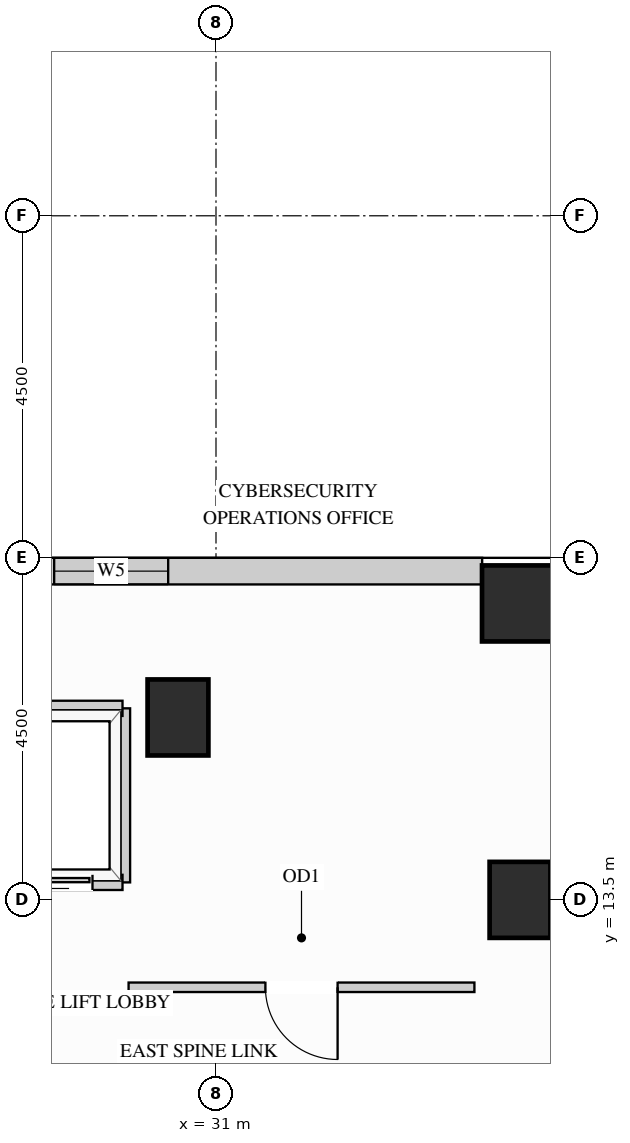
"""IFC4 building model, lengths in metres.
Left out: names, types, materials, properties, quantities, classifications, styles, units other than length and angle.
Written with IfcOpenShell. Run it as: python <this file> out.ifc"""

import sys

from ifc_helpers import new_model, si_unit, direction, frame, frame_2d, origin, origin_2d, place, context, subcontext, project, spatial, rectangle, extrude, source, transform, mapped, element, fill, save


model = new_model("IFC4")
c1 = context("Model", 3, precision=1e-05, world=origin(), true_north=direction((0.0, 1.0)))
c2 = subcontext(c1, "Body", "Model", "MODEL_VIEW")
j1 = project(units=[si_unit("LENGTHUNIT", "METRE"), si_unit("PLANEANGLEUNIT", "RADIAN")], contexts=[c1])
p1 = place(None, origin())
s1 = spatial("IfcSite", under=j1, at=p1, CompositionType="ELEMENT")
p2 = place(p1, origin())
s2 = spatial("IfcBuilding", under=s1, at=p2, CompositionType="ELEMENT")
p3 = place(p2, frame((0.0, 0.0, 193.5)))
s3 = spatial("IfcBuildingStorey", under=s2, at=p3, CompositionType="ELEMENT", Elevation=193.5)
m1 = source(origin(), c2, "Body", "SweptSolid", [
    extrude(rectangle(XDim=0.8, YDim=1.0, at=origin_2d()), origin(), (0.0, 0.0, 1.0), 3.4),
])
for number, where, z_axis, x_axis in (
    (1, (35.0, 13.5, 0.0), (0.0, 0.0, 1.0), (1.0, 0.0, 0.0)),
    (2, (30.5, 15.9, 0.0), (0.0, 0.0, 1.0), (1.0, 0.0, 0.0)),
):
    element("IfcColumn", number, at=place(p3, frame(where, z_axis=z_axis, x_axis=x_axis)), inside=s3, PredefinedType="COLUMN", context=c2, shape_type="MappedRepresentation", body=[
        mapped(m1, transform((0.0, 0.0, 0.0), x_axis=(1.0, 0.0, 0.0), y_axis=(0.0, 1.0, 0.0), z_axis=(0.0, 0.0, 1.0))),
    ])
m2 = source(origin(), c2, "Body", "SweptSolid", [
    extrude(rectangle(XDim=1.0, YDim=1.0, at=origin_2d()), origin(), (0.0, 0.0, 1.0), 3.4),
])
p4 = place(p3, frame((35.0, 17.4, 0.0), z_axis=(0.0, 0.0, 1.0), x_axis=(1.0, 0.0, 0.0)))
e3 = element("IfcColumn", 3, at=p4, inside=s3, PredefinedType="COLUMN", context=c2, shape_type="MappedRepresentation", body=[
    mapped(m2, transform((0.0, 0.0, 0.0), x_axis=(1.0, 0.0, 0.0), y_axis=(0.0, 1.0, 0.0), z_axis=(0.0, 0.0, 1.0))),
])
p5 = place(p3, frame((34.502, 17.825, 0.0), z_axis=(0.0, 0.0, 1.0), x_axis=(-1.0, 0.0, 0.0)))
e4 = element("IfcWall", 4, at=p5, inside=s3, PredefinedType="SOLIDWALL", context=c2, shape_type="SweptSolid", body=[
    extrude(rectangle(XDim=15.104, YDim=0.35, at=frame_2d((7.552, 0.0))), origin(), (0.0, 0.0, 1.0), 3.385),
])
p6 = place(p5, frame((4.131, 0.0, 0.78)))
e5 = element("IfcOpeningElement", 5, at=p6, cuts=e4, PredefinedType="OPENING", context=c2, shape_type="SweptSolid", body=[
    extrude(rectangle(XDim=1.5, YDim=2.0, at=frame_2d((0.75, 1.0))), frame((0.0, 0.185, 0.0), z_axis=(0.0, -1.0, 0.0), x_axis=(1.0, 0.0, 0.0)), (0.0, 0.0, 1.0), 0.37),
])
p7 = place(p5, frame((9.442, 0.0, 0.78)))
e6 = element("IfcOpeningElement", 6, at=p7, cuts=e4, PredefinedType="OPENING", context=c2, shape_type="SweptSolid", body=[
    extrude(rectangle(XDim=1.5, YDim=2.0, at=frame_2d((0.75, 1.0))), frame((0.0, 0.185, 0.0), z_axis=(0.0, -1.0, 0.0), x_axis=(1.0, 0.0, 0.0)), (0.0, 0.0, 1.0), 0.37),
])
p8 = place(p3, frame((29.85, 12.35, 0.0), z_axis=(0.0, 0.0, 1.0), x_axis=(1.0, 0.0, 0.0)))
e7 = element("IfcWall", 7, at=p8, inside=s3, PredefinedType="PARTITIONING", context=c2, shape_type="SweptSolid", body=[
    extrude(rectangle(XDim=4.55, YDim=0.125, at=frame_2d((2.275, 0.0))), origin(), (0.0, 0.0, 1.0), 3.385),
])
p9 = place(p8, frame((1.8, 0.0, 0.0)))
e8 = element("IfcOpeningElement", 8, at=p9, cuts=e7, PredefinedType="OPENING", context=c2, shape_type="SweptSolid", body=[
    extrude(rectangle(XDim=0.95, YDim=2.15, at=frame_2d((0.475, 1.075))), frame((0.0, 0.073, 0.0), z_axis=(0.0, -1.0, 0.0), x_axis=(1.0, 0.0, 0.0)), (0.0, 0.0, 1.0), 0.145),
])
m3 = source(origin(), c2, "Body", "SweptSolid", [
    extrude(rectangle(XDim=2.29, YDim=0.2, at=frame_2d((1.145, 0.0))), origin(), (0.0, 0.0, 1.0), 3.385),
])
p10 = place(p3, frame((29.77, 13.73, 0.0), z_axis=(0.0, 0.0, 1.0), x_axis=(0.0, 1.0, 0.0)))
e9 = element("IfcWall", 9, at=p10, inside=s3, PredefinedType="PARTITIONING", context=c2, shape_type="MappedRepresentation", body=[
    mapped(m3, transform((0.0, 0.0, 0.0), x_axis=(1.0, 0.0, 0.0), y_axis=(0.0, 1.0, 0.0), z_axis=(0.0, 0.0, 1.0))),
])
m4 = source(origin(), c2, "Body", "SweptSolid", [
    extrude(rectangle(XDim=1.89, YDim=0.2, at=frame_2d((0.945, 0.0))), origin(), (0.0, 0.0, 1.0), 2.773),
])
p11 = place(p3, frame((27.88, 16.02, 0.0), z_axis=(0.0, 0.0, 1.0), x_axis=(1.0, 0.0, 0.0)))
e10 = element("IfcWall", 10, at=p11, inside=s3, PredefinedType="PARTITIONING", context=c2, shape_type="MappedRepresentation", body=[
    mapped(m4, transform((0.0, 0.0, 0.0), x_axis=(1.0, 0.0, 0.0), y_axis=(0.0, 1.0, 0.0), z_axis=(0.0, 0.0, 1.0))),
])
p12 = place(p3, frame((27.88, 13.73, 0.0), z_axis=(0.0, 0.0, 1.0), x_axis=(1.0, 0.0, 0.0)))
e11 = element("IfcWall", 11, at=p12, inside=s3, PredefinedType="PARTITIONING", context=c2, shape_type="SweptSolid", body=[
    extrude(rectangle(XDim=1.89, YDim=0.2, at=frame_2d((0.945, 0.0))), origin(), (0.0, 0.0, 1.0), 2.466),
])
p13 = place(p12, frame((0.395, 0.0, 0.0)))
e12 = element("IfcOpeningElement", 12, at=p13, cuts=e11, PredefinedType="OPENING", context=c2, shape_type="SweptSolid", body=[
    extrude(rectangle(XDim=1.1, YDim=2.2, at=frame_2d((0.55, 1.1))), frame((0.0, 0.11, 0.0), z_axis=(0.0, -1.0, 0.0), x_axis=(1.0, 0.0, 0.0)), (0.0, 0.0, 1.0), 0.22),
])
m5 = source(origin(), c2, "Body", "SweptSolid", [
    extrude(rectangle(XDim=1.1, YDim=2.2, at=frame_2d((0.55, 1.1))), frame((0.0, 0.025, 0.0), z_axis=(0.0, -1.0, 0.0), x_axis=(1.0, 0.0, 0.0)), (0.0, 0.0, 1.0), 0.05),
])
p14 = place(p13, origin())
e13 = element("IfcDoor", 13, at=p14, inside=s3, OperationType="SLIDING_TO_LEFT", PredefinedType="DOOR", context=c2, shape_type="MappedRepresentation", body=[
    mapped(m5, transform((0.0, 0.0, 0.0), x_axis=(1.0, 0.0, 0.0), y_axis=(0.0, 1.0, 0.0), z_axis=(0.0, 0.0, 1.0))),
])
fill(e12, e13)
m6 = source(origin(), c2, "Body", "SweptSolid", [
    extrude(rectangle(XDim=0.95, YDim=2.15, at=frame_2d((0.475, 1.075))), frame((0.0, 0.025, 0.0), z_axis=(0.0, -1.0, 0.0), x_axis=(1.0, 0.0, 0.0)), (0.0, 0.0, 1.0), 0.05),
])
p15 = place(p9, origin())
e14 = element("IfcDoor", 14, at=p15, inside=s3, OperationType="SINGLE_SWING_RIGHT", PredefinedType="DOOR", context=c2, shape_type="MappedRepresentation", body=[
    mapped(m6, transform((0.0, 0.0, 0.0), x_axis=(1.0, 0.0, 0.0), y_axis=(0.0, 1.0, 0.0), z_axis=(0.0, 0.0, 1.0))),
])
fill(e8, e14)
m7 = source(origin(), c2, "Body", "SweptSolid", [
    extrude(rectangle(XDim=1.5, YDim=2.0, at=frame_2d((0.75, 1.0))), frame((0.0, 0.03, 0.0), z_axis=(0.0, -1.0, 0.0), x_axis=(1.0, 0.0, 0.0)), (0.0, 0.0, 1.0), 0.06),
])
p16 = place(p6, origin())
e15 = element("IfcWindow", 15, at=p16, inside=s3, PartitioningType="SINGLE_PANEL", PredefinedType="WINDOW", context=c2, shape_type="MappedRepresentation", body=[
    mapped(m7, transform((0.0, 0.0, 0.0), x_axis=(1.0, 0.0, 0.0), y_axis=(0.0, 1.0, 0.0), z_axis=(0.0, 0.0, 1.0))),
])
fill(e5, e15)
save(model, sys.argv[1])
